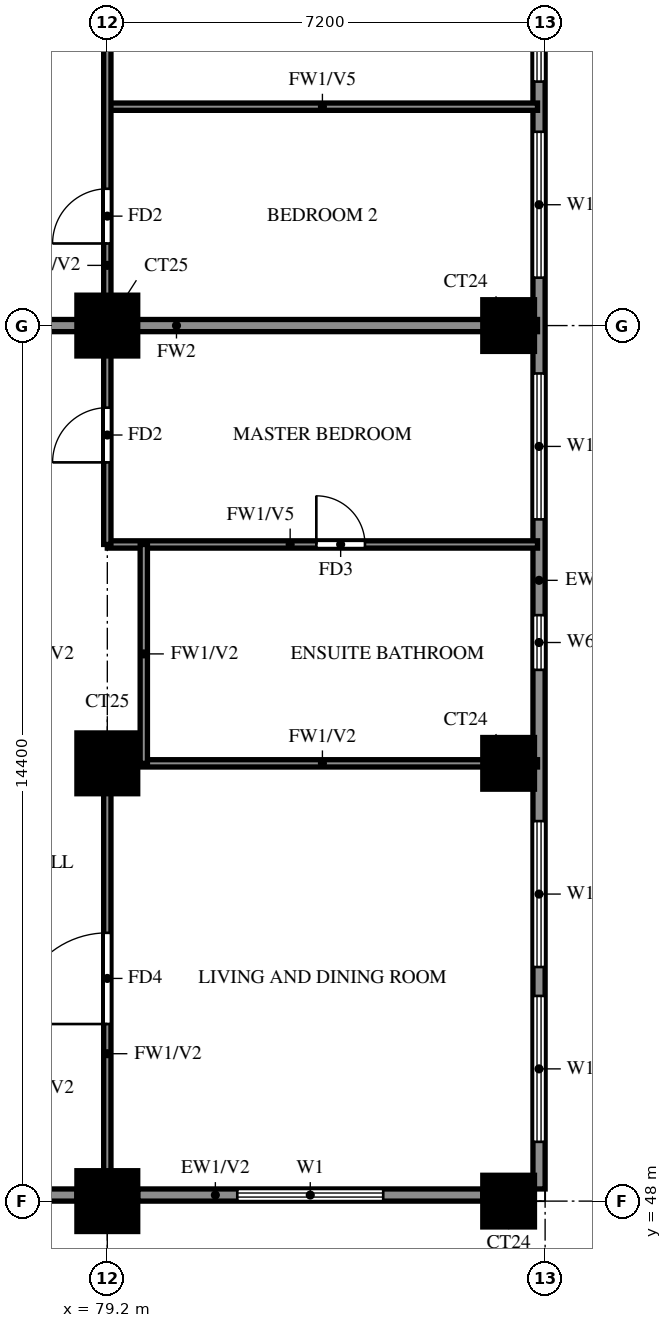
"""IFC4 building model, lengths in metres.
Left out: names, types, materials, properties, quantities, classifications, styles, units other than length and angle.
Written with IfcOpenShell. Run it as: python <this file> out.ifc"""

import sys

from ifc_helpers import new_model, si_unit, direction, frame, frame_2d, origin, origin_2d, place, context, subcontext, project, spatial, rectangle, extrude, source, transform, mapped, element, fill, save


model = new_model("IFC4")
c1 = context("Model", 3, precision=1e-05, world=origin(), true_north=direction((0.0, 1.0)))
c2 = subcontext(c1, "Body", "Model", "MODEL_VIEW")
j1 = project(units=[si_unit("LENGTHUNIT", "METRE"), si_unit("PLANEANGLEUNIT", "RADIAN")], contexts=[c1])
p1 = place(None, origin())
s1 = spatial("IfcSite", under=j1, at=p1, CompositionType="ELEMENT")
p2 = place(p1, origin())
s2 = spatial("IfcBuilding", under=s1, at=p2, CompositionType="ELEMENT")
p3 = place(p2, frame((0.0, 0.0, 164.0)))
s3 = spatial("IfcBuildingStorey", under=s2, at=p3, CompositionType="ELEMENT", Elevation=164.0)
m1 = source(origin(), c2, "Body", "SweptSolid", [
    extrude(rectangle(XDim=1.0, YDim=1.0, at=origin_2d()), origin(), (0.0, 0.0, 1.0), 3.2),
])
p4 = place(p3, frame((79.2, 48.0, 0.0), z_axis=(0.0, 0.0, 1.0), x_axis=(1.0, 0.0, 0.0)))
e1 = element("IfcColumn", 1, at=p4, inside=s3, PredefinedType="COLUMN", context=c2, shape_type="MappedRepresentation", body=[
    mapped(m1, transform((0.0, 0.0, 0.0))),
])
m2 = source(origin(), c2, "Body", "SweptSolid", [
    extrude(rectangle(XDim=0.85, YDim=0.85, at=origin_2d()), origin(), (0.0, 0.0, 1.0), 3.2),
])
p5 = place(p3, frame((85.8, 48.0, 0.0), z_axis=(0.0, 0.0, 1.0), x_axis=(1.0, 0.0, 0.0)))
e2 = element("IfcColumn", 2, at=p5, inside=s3, PredefinedType="COLUMN", context=c2, shape_type="MappedRepresentation", body=[
    mapped(m2, transform((0.0, 0.0, 0.0))),
])
p6 = place(p3, frame((79.2, 55.2, 0.0), z_axis=(0.0, 0.0, 1.0), x_axis=(1.0, 0.0, 0.0)))
e3 = element("IfcColumn", 3, at=p6, inside=s3, PredefinedType="COLUMN", context=c2, shape_type="MappedRepresentation", body=[
    mapped(m1, transform((0.0, 0.0, 0.0))),
])
p7 = place(p3, frame((85.8, 55.2, 0.0), z_axis=(0.0, 0.0, 1.0), x_axis=(1.0, 0.0, 0.0)))
e4 = element("IfcColumn", 4, at=p7, inside=s3, PredefinedType="COLUMN", context=c2, shape_type="MappedRepresentation", body=[
    mapped(m2, transform((0.0, 0.0, 0.0))),
])
p8 = place(p3, frame((79.2, 62.4, 0.0), z_axis=(0.0, 0.0, 1.0), x_axis=(1.0, 0.0, 0.0)))
e5 = element("IfcColumn", 5, at=p8, inside=s3, PredefinedType="COLUMN", context=c2, shape_type="MappedRepresentation", body=[
    mapped(m1, transform((0.0, 0.0, 0.0))),
])
p9 = place(p3, frame((85.8, 62.4, 0.0), z_axis=(0.0, 0.0, 1.0), x_axis=(1.0, 0.0, 0.0)))
e6 = element("IfcColumn", 6, at=p9, inside=s3, PredefinedType="COLUMN", context=c2, shape_type="MappedRepresentation", body=[
    mapped(m2, transform((0.0, 0.0, 0.0))),
])
p10 = place(p3, frame((85.719, 39.881, 0.0), z_axis=(0.0, 0.0, 1.0), x_axis=(-0.86377618652, 0.503875678716, 0.0)))
e7 = element("IfcWall", 7, at=p10, inside=s3, PredefinedType="SOLIDWALL", context=c2, shape_type="SweptSolid", body=[
    extrude(rectangle(XDim=16.311, YDim=0.2, at=frame_2d((8.156, 0.0))), origin(), (0.0, 0.0, 1.0), 3.2),
])
p11 = place(p10, frame((13.326, 0.0, 1.5)))
e8 = element("IfcOpeningElement", 8, at=p11, cuts=e7, PredefinedType="OPENING", context=c2, shape_type="SweptSolid", body=[
    extrude(rectangle(XDim=0.9, YDim=0.9, at=frame_2d((0.45, 0.45))), frame((0.0, 0.11, 0.0), z_axis=(0.0, -1.0, 0.0), x_axis=(1.0, 0.0, 0.0)), (0.0, 0.0, 1.0), 0.22),
])
p12 = place(p3, frame((71.99, 48.1, 0.0), z_axis=(0.0, 0.0, 1.0), x_axis=(1.0, 0.0, 0.0)))
e9 = element("IfcWall", 9, at=p12, inside=s3, PredefinedType="SOLIDWALL", context=c2, shape_type="SweptSolid", body=[
    extrude(rectangle(XDim=6.71, YDim=0.2, at=frame_2d((3.355, 0.0))), origin(), (0.0, 0.0, 1.0), 3.2),
])
p13 = place(p3, frame((79.7, 48.1, 0.0), z_axis=(0.0, 0.0, 1.0), x_axis=(1.0, 0.0, 0.0)))
e10 = element("IfcWall", 10, at=p13, inside=s3, PredefinedType="SOLIDWALL", context=c2, shape_type="SweptSolid", body=[
    extrude(rectangle(XDim=5.675, YDim=0.2, at=frame_2d((2.837, 0.0))), origin(), (0.0, 0.0, 1.0), 3.2),
])
p14 = place(p13, frame((1.637, 0.0, 0.6)))
e11 = element("IfcOpeningElement", 11, at=p14, cuts=e10, PredefinedType="OPENING", context=c2, shape_type="SweptSolid", body=[
    extrude(rectangle(XDim=2.4, YDim=2.4, at=frame_2d((1.2, 1.2))), frame((0.0, 0.11, 0.0), z_axis=(0.0, -1.0, 0.0), x_axis=(1.0, 0.0, 0.0)), (0.0, 0.0, 1.0), 0.22),
])
p15 = place(p3, frame((86.3, 48.2, 0.0), z_axis=(0.0, 0.0, 1.0), x_axis=(0.0, 1.0, 0.0)))
e12 = element("IfcWall", 12, at=p15, inside=s3, PredefinedType="SOLIDWALL", context=c2, shape_type="SweptSolid", body=[
    extrude(rectangle(XDim=28.6, YDim=0.2, at=frame_2d((14.3, 0.0))), origin(), (0.0, 0.0, 1.0), 3.2),
])
p16 = place(p15, frame((0.775, 0.0, 0.6)))
e13 = element("IfcOpeningElement", 13, at=p16, cuts=e12, PredefinedType="OPENING", context=c2, shape_type="SweptSolid", body=[
    extrude(rectangle(XDim=2.4, YDim=2.4, at=frame_2d((1.2, 1.2))), frame((0.0, 0.11, 0.0), z_axis=(0.0, -1.0, 0.0), x_axis=(1.0, 0.0, 0.0)), (0.0, 0.0, 1.0), 0.22),
])
p17 = place(p15, frame((3.65, 0.0, 0.6)))
e14 = element("IfcOpeningElement", 14, at=p17, cuts=e12, PredefinedType="OPENING", context=c2, shape_type="SweptSolid", body=[
    extrude(rectangle(XDim=2.4, YDim=2.4, at=frame_2d((1.2, 1.2))), frame((0.0, 0.11, 0.0), z_axis=(0.0, -1.0, 0.0), x_axis=(1.0, 0.0, 0.0)), (0.0, 0.0, 1.0), 0.22),
])
p18 = place(p15, frame((11.012, 0.0, 0.6)))
e15 = element("IfcOpeningElement", 15, at=p18, cuts=e12, PredefinedType="OPENING", context=c2, shape_type="SweptSolid", body=[
    extrude(rectangle(XDim=2.4, YDim=2.4, at=frame_2d((1.2, 1.2))), frame((0.0, 0.11, 0.0), z_axis=(0.0, -1.0, 0.0), x_axis=(1.0, 0.0, 0.0)), (0.0, 0.0, 1.0), 0.22),
])
p19 = place(p15, frame((8.538, 0.0, 1.5)))
e16 = element("IfcOpeningElement", 16, at=p19, cuts=e12, PredefinedType="OPENING", context=c2, shape_type="SweptSolid", body=[
    extrude(rectangle(XDim=0.9, YDim=0.9, at=frame_2d((0.45, 0.45))), frame((0.0, 0.11, 0.0), z_axis=(0.0, -1.0, 0.0), x_axis=(1.0, 0.0, 0.0)), (0.0, 0.0, 1.0), 0.22),
])
p20 = place(p15, frame((14.988, 0.0, 0.6)))
e17 = element("IfcOpeningElement", 17, at=p20, cuts=e12, PredefinedType="OPENING", context=c2, shape_type="SweptSolid", body=[
    extrude(rectangle(XDim=2.4, YDim=2.4, at=frame_2d((1.2, 1.2))), frame((0.0, 0.11, 0.0), z_axis=(0.0, -1.0, 0.0), x_axis=(1.0, 0.0, 0.0)), (0.0, 0.0, 1.0), 0.22),
])
p21 = place(p15, frame((18.212, 0.0, 0.6)))
e18 = element("IfcOpeningElement", 18, at=p21, cuts=e12, PredefinedType="OPENING", context=c2, shape_type="SweptSolid", body=[
    extrude(rectangle(XDim=2.4, YDim=2.4, at=frame_2d((1.2, 1.2))), frame((0.0, 0.11, 0.0), z_axis=(0.0, -1.0, 0.0), x_axis=(1.0, 0.0, 0.0)), (0.0, 0.0, 1.0), 0.22),
])
p22 = place(p15, frame((22.938, 0.0, 1.5)))
e19 = element("IfcOpeningElement", 19, at=p22, cuts=e12, PredefinedType="OPENING", context=c2, shape_type="SweptSolid", body=[
    extrude(rectangle(XDim=0.9, YDim=0.9, at=frame_2d((0.45, 0.45))), frame((0.0, 0.11, 0.0), z_axis=(0.0, -1.0, 0.0), x_axis=(1.0, 0.0, 0.0)), (0.0, 0.0, 1.0), 0.22),
])
p23 = place(p15, frame((25.413, 0.0, 0.6)))
e20 = element("IfcOpeningElement", 20, at=p23, cuts=e12, PredefinedType="OPENING", context=c2, shape_type="SweptSolid", body=[
    extrude(rectangle(XDim=2.4, YDim=2.4, at=frame_2d((1.2, 1.2))), frame((0.0, 0.11, 0.0), z_axis=(0.0, -1.0, 0.0), x_axis=(1.0, 0.0, 0.0)), (0.0, 0.0, 1.0), 0.22),
])
p24 = place(p3, frame((74.4, 62.4, 0.0), z_axis=(0.0, 0.0, 1.0), x_axis=(1.0, 0.0, 0.0)))
e21 = element("IfcWall", 21, at=p24, inside=s3, PredefinedType="SOLIDWALL", context=c2, shape_type="SweptSolid", body=[
    extrude(rectangle(XDim=11.875, YDim=0.2, at=frame_2d((5.938, 0.0))), origin(), (0.0, 0.0, 1.0), 3.2),
])
p25 = place(p3, frame((79.2, 55.2, 0.0), z_axis=(0.0, 0.0, 1.0), x_axis=(1.0, 0.0, 0.0)))
e22 = element("IfcWall", 22, at=p25, inside=s3, PredefinedType="PARTITIONING", context=c2, shape_type="SweptSolid", body=[
    extrude(rectangle(XDim=7.075, YDim=0.12, at=frame_2d((3.538, 0.0))), origin(), (0.0, 0.0, 1.0), 3.2),
])
p26 = place(p3, frame((79.2, 58.8, 0.0), z_axis=(0.0, 0.0, 1.0), x_axis=(1.0, 0.0, 0.0)))
e23 = element("IfcWall", 23, at=p26, inside=s3, PredefinedType="PARTITIONING", context=c2, shape_type="SweptSolid", body=[
    extrude(rectangle(XDim=7.075, YDim=0.12, at=frame_2d((3.538, 0.0))), origin(), (0.0, 0.0, 1.0), 2.3),
])
p27 = place(p26, frame((3.438, 0.0, 0.0)))
e24 = element("IfcOpeningElement", 24, at=p27, cuts=e23, PredefinedType="OPENING", context=c2, shape_type="SweptSolid", body=[
    extrude(rectangle(XDim=0.8, YDim=2.1, at=frame_2d((0.4, 1.05))), frame((0.0, 0.07, 0.0), z_axis=(0.0, -1.0, 0.0), x_axis=(1.0, 0.0, 0.0)), (0.0, 0.0, 1.0), 0.14),
])
p28 = place(p3, frame((79.2, 66.0, 0.0), z_axis=(0.0, 0.0, 1.0), x_axis=(1.0, 0.0, 0.0)))
e25 = element("IfcWall", 25, at=p28, inside=s3, PredefinedType="PARTITIONING", context=c2, shape_type="SweptSolid", body=[
    extrude(rectangle(XDim=7.075, YDim=0.12, at=frame_2d((3.538, 0.0))), origin(), (0.0, 0.0, 1.0), 2.3),
])
p29 = place(p3, frame((79.2, 48.125, 0.0), z_axis=(0.0, 0.0, 1.0), x_axis=(0.0, 1.0, 0.0)))
e26 = element("IfcWall", 26, at=p29, inside=s3, PredefinedType="PARTITIONING", context=c2, shape_type="SweptSolid", body=[
    extrude(rectangle(XDim=7.075, YDim=0.12, at=frame_2d((3.538, 0.0))), origin(), (0.0, 0.0, 1.0), 3.2),
])
p30 = place(p29, frame((2.788, 0.0, 0.0)))
e27 = element("IfcOpeningElement", 27, at=p30, cuts=e26, PredefinedType="OPENING", context=c2, shape_type="SweptSolid", body=[
    extrude(rectangle(XDim=1.5, YDim=2.1, at=frame_2d((0.75, 1.05))), frame((0.0, 0.07, 0.0), z_axis=(0.0, -1.0, 0.0), x_axis=(1.0, 0.0, 0.0)), (0.0, 0.0, 1.0), 0.14),
])
p31 = place(p3, frame((79.2, 58.8, 0.0), z_axis=(0.0, 0.0, 1.0), x_axis=(0.0, 1.0, 0.0)))
e28 = element("IfcWall", 28, at=p31, inside=s3, PredefinedType="PARTITIONING", context=c2, shape_type="SweptSolid", body=[
    extrude(rectangle(XDim=10.8, YDim=0.12, at=frame_2d((5.4, 0.0))), origin(), (0.0, 0.0, 1.0), 3.2),
])
p32 = place(p31, frame((1.35, 0.0, 0.0)))
e29 = element("IfcOpeningElement", 29, at=p32, cuts=e28, PredefinedType="OPENING", context=c2, shape_type="SweptSolid", body=[
    extrude(rectangle(XDim=0.9, YDim=2.1, at=frame_2d((0.45, 1.05))), frame((0.0, 0.07, 0.0), z_axis=(0.0, -1.0, 0.0), x_axis=(1.0, 0.0, 0.0)), (0.0, 0.0, 1.0), 0.14),
])
p33 = place(p31, frame((4.95, 0.0, 0.0)))
e30 = element("IfcOpeningElement", 30, at=p33, cuts=e28, PredefinedType="OPENING", context=c2, shape_type="SweptSolid", body=[
    extrude(rectangle(XDim=0.9, YDim=2.1, at=frame_2d((0.45, 1.05))), frame((0.0, 0.07, 0.0), z_axis=(0.0, -1.0, 0.0), x_axis=(1.0, 0.0, 0.0)), (0.0, 0.0, 1.0), 0.14),
])
p34 = place(p31, frame((8.55, 0.0, 0.0)))
e31 = element("IfcOpeningElement", 31, at=p34, cuts=e28, PredefinedType="OPENING", context=c2, shape_type="SweptSolid", body=[
    extrude(rectangle(XDim=0.9, YDim=2.1, at=frame_2d((0.45, 1.05))), frame((0.0, 0.07, 0.0), z_axis=(0.0, -1.0, 0.0), x_axis=(1.0, 0.0, 0.0)), (0.0, 0.0, 1.0), 0.14),
])
p35 = place(p3, frame((79.8, 55.2, 0.0), z_axis=(0.0, 0.0, 1.0), x_axis=(0.0, 1.0, 0.0)))
e32 = element("IfcWall", 32, at=p35, inside=s3, PredefinedType="PARTITIONING", context=c2, shape_type="SweptSolid", body=[
    extrude(rectangle(XDim=3.6, YDim=0.12, at=frame_2d((1.8, 0.0))), origin(), (0.0, 0.0, 1.0), 3.2),
])
p36 = place(p14, origin())
e33 = element("IfcWindow", 33, at=p36, inside=s3, PartitioningType="DOUBLE_PANEL_VERTICAL", PredefinedType="WINDOW", context=c2, shape_type="SweptSolid", body=[
    extrude(rectangle(XDim=2.4, YDim=2.4, at=frame_2d((1.2, 1.2))), frame((0.0, 0.03, 0.0), z_axis=(0.0, -1.0, 0.0), x_axis=(1.0, 0.0, 0.0)), (0.0, 0.0, 1.0), 0.06),
])
fill(e11, e33)
p37 = place(p16, origin())
e34 = element("IfcWindow", 34, at=p37, inside=s3, PartitioningType="DOUBLE_PANEL_VERTICAL", PredefinedType="WINDOW", context=c2, shape_type="SweptSolid", body=[
    extrude(rectangle(XDim=2.4, YDim=2.4, at=frame_2d((1.2, 1.2))), frame((0.0, 0.03, 0.0), z_axis=(0.0, -1.0, 0.0), x_axis=(1.0, 0.0, 0.0)), (0.0, 0.0, 1.0), 0.06),
])
fill(e13, e34)
p38 = place(p17, origin())
e35 = element("IfcWindow", 35, at=p38, inside=s3, PartitioningType="DOUBLE_PANEL_VERTICAL", PredefinedType="WINDOW", context=c2, shape_type="SweptSolid", body=[
    extrude(rectangle(XDim=2.4, YDim=2.4, at=frame_2d((1.2, 1.2))), frame((0.0, 0.03, 0.0), z_axis=(0.0, -1.0, 0.0), x_axis=(1.0, 0.0, 0.0)), (0.0, 0.0, 1.0), 0.06),
])
fill(e14, e35)
p39 = place(p18, origin())
e36 = element("IfcWindow", 36, at=p39, inside=s3, PartitioningType="DOUBLE_PANEL_VERTICAL", PredefinedType="WINDOW", context=c2, shape_type="SweptSolid", body=[
    extrude(rectangle(XDim=2.4, YDim=2.4, at=frame_2d((1.2, 1.2))), frame((0.0, 0.03, 0.0), z_axis=(0.0, -1.0, 0.0), x_axis=(1.0, 0.0, 0.0)), (0.0, 0.0, 1.0), 0.06),
])
fill(e15, e36)
p40 = place(p19, origin())
e37 = element("IfcWindow", 37, at=p40, inside=s3, PartitioningType="SINGLE_PANEL", PredefinedType="WINDOW", context=c2, shape_type="SweptSolid", body=[
    extrude(rectangle(XDim=0.9, YDim=0.9, at=frame_2d((0.45, 0.45))), frame((0.0, 0.03, 0.0), z_axis=(0.0, -1.0, 0.0), x_axis=(1.0, 0.0, 0.0)), (0.0, 0.0, 1.0), 0.06),
])
fill(e16, e37)
p41 = place(p20, origin())
e38 = element("IfcWindow", 38, at=p41, inside=s3, PartitioningType="DOUBLE_PANEL_VERTICAL", PredefinedType="WINDOW", context=c2, shape_type="SweptSolid", body=[
    extrude(rectangle(XDim=2.4, YDim=2.4, at=frame_2d((1.2, 1.2))), frame((0.0, 0.03, 0.0), z_axis=(0.0, -1.0, 0.0), x_axis=(1.0, 0.0, 0.0)), (0.0, 0.0, 1.0), 0.06),
])
fill(e17, e38)
p42 = place(p21, origin())
e39 = element("IfcWindow", 39, at=p42, inside=s3, PartitioningType="DOUBLE_PANEL_VERTICAL", PredefinedType="WINDOW", context=c2, shape_type="SweptSolid", body=[
    extrude(rectangle(XDim=2.4, YDim=2.4, at=frame_2d((1.2, 1.2))), frame((0.0, 0.03, 0.0), z_axis=(0.0, -1.0, 0.0), x_axis=(1.0, 0.0, 0.0)), (0.0, 0.0, 1.0), 0.06),
])
fill(e18, e39)
p43 = place(p30, origin())
e40 = element("IfcDoor", 40, at=p43, inside=s3, OperationType="SINGLE_SWING_LEFT", PredefinedType="DOOR", context=c2, shape_type="SweptSolid", body=[
    extrude(rectangle(XDim=1.5, YDim=2.1, at=frame_2d((0.75, 1.05))), frame((0.0, 0.025, 0.0), z_axis=(0.0, -1.0, 0.0), x_axis=(1.0, 0.0, 0.0)), (0.0, 0.0, 1.0), 0.05),
])
fill(e27, e40)
p44 = place(p32, origin())
e41 = element("IfcDoor", 41, at=p44, inside=s3, OperationType="SINGLE_SWING_RIGHT", PredefinedType="DOOR", context=c2, shape_type="SweptSolid", body=[
    extrude(rectangle(XDim=0.9, YDim=2.1, at=frame_2d((0.45, 1.05))), frame((0.0, 0.025, 0.0), z_axis=(0.0, -1.0, 0.0), x_axis=(1.0, 0.0, 0.0)), (0.0, 0.0, 1.0), 0.05),
])
fill(e29, e41)
p45 = place(p27, origin())
e42 = element("IfcDoor", 42, at=p45, inside=s3, OperationType="SINGLE_SWING_LEFT", PredefinedType="DOOR", context=c2, shape_type="SweptSolid", body=[
    extrude(rectangle(XDim=0.8, YDim=2.1, at=frame_2d((0.4, 1.05))), frame((0.0, 0.025, 0.0), z_axis=(0.0, -1.0, 0.0), x_axis=(1.0, 0.0, 0.0)), (0.0, 0.0, 1.0), 0.05),
])
fill(e24, e42)
p46 = place(p33, origin())
e43 = element("IfcDoor", 43, at=p46, inside=s3, OperationType="SINGLE_SWING_LEFT", PredefinedType="DOOR", context=c2, shape_type="SweptSolid", body=[
    extrude(rectangle(XDim=0.9, YDim=2.1, at=frame_2d((0.45, 1.05))), frame((0.0, 0.025, 0.0), z_axis=(0.0, -1.0, 0.0), x_axis=(1.0, 0.0, 0.0)), (0.0, 0.0, 1.0), 0.05),
])
fill(e30, e43)
save(model, sys.argv[1])
